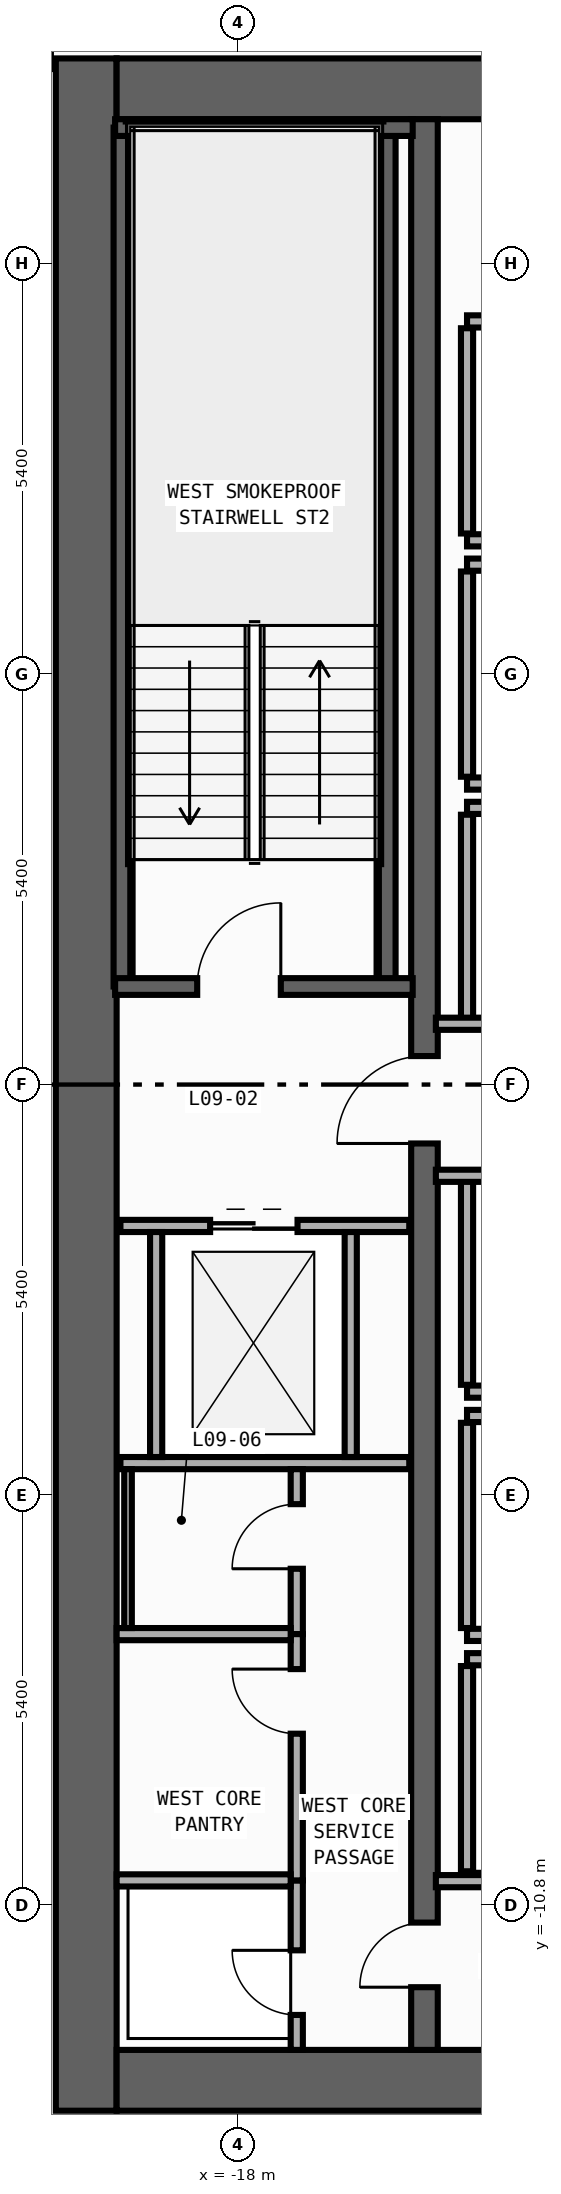
"""IFC4 building model, lengths in metres.
Left out: names, types, materials, properties, quantities, classifications, styles, units other than length and angle.
Written with IfcOpenShell. Run it as: python <this file> out.ifc"""

import sys

from ifc_helpers import new_model, si_unit, direction, frame, frame_2d, origin, place, context, subcontext, project, spatial, rectangle, extrude, element, fill, save


model = new_model("IFC4")
c1 = context("Model", 3, precision=1e-05, world=origin(), true_north=direction((0.0, 1.0)))
c2 = subcontext(c1, "Body", "Model", "MODEL_VIEW")
j1 = project(units=[si_unit("LENGTHUNIT", "METRE"), si_unit("PLANEANGLEUNIT", "RADIAN")], contexts=[c1])
p1 = place(None, origin())
s1 = spatial("IfcSite", under=j1, at=p1, CompositionType="ELEMENT")
p2 = place(p1, origin())
s2 = spatial("IfcBuilding", under=s1, at=p2, CompositionType="ELEMENT")
p3 = place(p2, frame((0.0, 0.0, 38.6)))
s3 = spatial("IfcBuildingStorey", under=s2, at=p3, CompositionType="ELEMENT", Elevation=38.6)
p4 = place(p3, frame((-20.0, -13.5, 0.0), z_axis=(0.0, 0.0, 1.0), x_axis=(0.0, 1.0, 0.0)))
e1 = element("IfcWall", 1, at=p4, inside=s3, PredefinedType="SHEAR", context=c2, shape_type="SweptSolid", body=[
    extrude(rectangle(XDim=27.0, YDim=0.8, at=frame_2d((13.5, 0.0))), origin(), (0.0, 0.0, 1.0), 3.94),
])
for number, where, z_axis, x_axis in (
    (2, (-19.6, -13.1, 0.0), (0.0, 0.0, 1.0), (1.0, 0.0, 0.0)),
    (3, (-19.6, 13.1, 0.0), (0.0, 0.0, 1.0), (1.0, 0.0, 0.0)),
):
    element("IfcWall", number, at=place(p3, frame(where, z_axis=z_axis, x_axis=x_axis)), inside=s3, PredefinedType="SHEAR", context=c2, shape_type="SweptSolid", body=[
        extrude(rectangle(XDim=6.8, YDim=0.8, at=frame_2d((3.4, 0.0))), origin(), (0.0, 0.0, 1.0), 3.94),
    ])
p5 = place(p3, frame((-15.55, -12.7, 0.0), z_axis=(0.0, 0.0, 1.0), x_axis=(0.0, 1.0, 0.0)))
e4 = element("IfcWall", 4, at=p5, inside=s3, PredefinedType="SHEAR", context=c2, shape_type="SweptSolid", body=[
    extrude(rectangle(XDim=25.4, YDim=0.35, at=frame_2d((12.7, 0.0))), origin(), (0.0, 0.0, 1.0), 3.94),
])
p6 = place(p5, frame((11.925, 0.0, 0.0)))
e5 = element("IfcOpeningElement", 5, at=p6, cuts=e4, PredefinedType="OPENING", context=c2, shape_type="SweptSolid", body=[
    extrude(rectangle(XDim=1.15, YDim=2.2, at=frame_2d((0.575, 1.1))), frame((0.0, 0.185, 0.0), z_axis=(0.0, -1.0, 0.0), x_axis=(1.0, 0.0, 0.0)), (0.0, 0.0, 1.0), 0.37),
])
p7 = place(p5, frame((0.825, 0.0, 0.0)))
e6 = element("IfcOpeningElement", 6, at=p7, cuts=e4, PredefinedType="OPENING", context=c2, shape_type="SweptSolid", body=[
    extrude(rectangle(XDim=0.85, YDim=2.1, at=frame_2d((0.425, 1.05))), frame((0.0, 0.185, 0.0), z_axis=(0.0, -1.0, 0.0), x_axis=(1.0, 0.0, 0.0)), (0.0, 0.0, 1.0), 0.37),
])
for number, where, z_axis, x_axis in (
    (7, (-16.04, 1.29, 0.0), (0.0, 0.0, 1.0), (0.0, 1.0, 0.0)),
    (8, (-19.53, 1.29, 0.0), (0.0, 0.0, 1.0), (0.0, 1.0, 0.0)),
):
    element("IfcWall", number, at=place(p3, frame(where, z_axis=z_axis, x_axis=x_axis)), inside=s3, PredefinedType="SHEAR", context=c2, shape_type="SweptSolid", body=[
        extrude(rectangle(XDim=11.3, YDim=0.22, at=frame_2d((5.65, 0.0))), origin(), (0.0, 0.0, 1.0), 3.94),
    ])
p8 = place(p3, frame((-19.62, 12.59, 0.0), z_axis=(0.0, 0.0, 1.0), x_axis=(1.0, 0.0, 0.0)))
e9 = element("IfcWall", 9, at=p8, inside=s3, PredefinedType="SHEAR", context=c2, shape_type="SweptSolid", body=[
    extrude(rectangle(XDim=3.915, YDim=0.22, at=frame_2d((1.958, 0.0))), origin(), (0.0, 0.0, 1.0), 3.94),
])
p9 = place(p3, frame((-19.62, 1.29, 0.0), z_axis=(0.0, 0.0, 1.0), x_axis=(1.0, 0.0, 0.0)))
e10 = element("IfcWall", 10, at=p9, inside=s3, PredefinedType="SHEAR", context=c2, shape_type="SweptSolid", body=[
    extrude(rectangle(XDim=3.915, YDim=0.22, at=frame_2d((1.958, 0.0))), origin(), (0.0, 0.0, 1.0), 3.94),
])
p10 = place(p9, frame((1.08, 0.0, 0.0)))
e11 = element("IfcOpeningElement", 11, at=p10, cuts=e10, PredefinedType="OPENING", context=c2, shape_type="SweptSolid", body=[
    extrude(rectangle(XDim=1.1, YDim=2.2, at=frame_2d((0.55, 1.1))), frame((0.0, 0.12, 0.0), z_axis=(0.0, -1.0, 0.0), x_axis=(1.0, 0.0, 0.0)), (0.0, 0.0, 1.0), 0.24),
])
for number, where, z_axis, x_axis in (
    (12, (-14.99, 7.16, 0.0), (0.0, 0.0, 1.0), (1.0, 0.0, 0.0)),
    (13, (-14.99, 10.04, 0.0), (0.0, 0.0, 1.0), (1.0, 0.0, 0.0)),
):
    element("IfcWall", number, at=place(p3, frame(where, z_axis=z_axis, x_axis=x_axis)), inside=s3, PredefinedType="STANDARD", context=c2, shape_type="SweptSolid", body=[
        extrude(rectangle(XDim=2.19, YDim=0.16, at=frame_2d((1.095, 0.0))), origin(), (0.0, 0.0, 1.0), 3.94),
    ])
p11 = place(p3, frame((-14.99, 7.25, 0.0), z_axis=(0.0, 0.0, 1.0), x_axis=(0.0, 1.0, 0.0)))
e14 = element("IfcWall", 14, at=p11, inside=s3, PredefinedType="STANDARD", context=c2, shape_type="SweptSolid", body=[
    extrude(rectangle(XDim=2.7, YDim=0.16, at=frame_2d((1.35, 0.0))), origin(), (0.0, 0.0, 1.0), 3.94),
])
for number, where, z_axis, x_axis in (
    (15, (-14.99, 3.96, 0.0), (0.0, 0.0, 1.0), (1.0, 0.0, 0.0)),
    (16, (-14.99, 6.84, 0.0), (0.0, 0.0, 1.0), (1.0, 0.0, 0.0)),
):
    element("IfcWall", number, at=place(p3, frame(where, z_axis=z_axis, x_axis=x_axis)), inside=s3, PredefinedType="STANDARD", context=c2, shape_type="SweptSolid", body=[
        extrude(rectangle(XDim=2.19, YDim=0.16, at=frame_2d((1.095, 0.0))), origin(), (0.0, 0.0, 1.0), 3.94),
    ])
p12 = place(p3, frame((-14.99, 4.05, 0.0), z_axis=(0.0, 0.0, 1.0), x_axis=(0.0, 1.0, 0.0)))
e17 = element("IfcWall", 17, at=p12, inside=s3, PredefinedType="STANDARD", context=c2, shape_type="SweptSolid", body=[
    extrude(rectangle(XDim=2.7, YDim=0.16, at=frame_2d((1.35, 0.0))), origin(), (0.0, 0.0, 1.0), 3.94),
])
p13 = place(p3, frame((-14.99, 3.64, 0.0), z_axis=(0.0, 0.0, 1.0), x_axis=(1.0, 0.0, 0.0)))
e18 = element("IfcWall", 18, at=p13, inside=s3, PredefinedType="STANDARD", context=c2, shape_type="SweptSolid", body=[
    extrude(rectangle(XDim=2.19, YDim=0.16, at=frame_2d((1.095, 0.0))), origin(), (0.0, 0.0, 1.0), 3.94),
])
p14 = place(p3, frame((-14.99, 0.85, 0.0), z_axis=(0.0, 0.0, 1.0), x_axis=(0.0, 1.0, 0.0)))
e19 = element("IfcWall", 19, at=p14, inside=s3, PredefinedType="STANDARD", context=c2, shape_type="SweptSolid", body=[
    extrude(rectangle(XDim=2.7, YDim=0.16, at=frame_2d((1.35, 0.0))), origin(), (0.0, 0.0, 1.0), 3.94),
])
p15 = place(p3, frame((-14.99, -4.04, 0.0), z_axis=(0.0, 0.0, 1.0), x_axis=(1.0, 0.0, 0.0)))
e20 = element("IfcWall", 20, at=p15, inside=s3, PredefinedType="STANDARD", context=c2, shape_type="SweptSolid", body=[
    extrude(rectangle(XDim=2.19, YDim=0.16, at=frame_2d((1.095, 0.0))), origin(), (0.0, 0.0, 1.0), 3.94),
])
p16 = place(p3, frame((-14.99, -3.95, 0.0), z_axis=(0.0, 0.0, 1.0), x_axis=(0.0, 1.0, 0.0)))
e21 = element("IfcWall", 21, at=p16, inside=s3, PredefinedType="STANDARD", context=c2, shape_type="SweptSolid", body=[
    extrude(rectangle(XDim=2.7, YDim=0.16, at=frame_2d((1.35, 0.0))), origin(), (0.0, 0.0, 1.0), 3.94),
])
for number, where, z_axis, x_axis in (
    (22, (-14.99, -7.24, 0.0), (0.0, 0.0, 1.0), (1.0, 0.0, 0.0)),
    (23, (-14.99, -4.36, 0.0), (0.0, 0.0, 1.0), (1.0, 0.0, 0.0)),
):
    element("IfcWall", number, at=place(p3, frame(where, z_axis=z_axis, x_axis=x_axis)), inside=s3, PredefinedType="STANDARD", context=c2, shape_type="SweptSolid", body=[
        extrude(rectangle(XDim=2.19, YDim=0.16, at=frame_2d((1.095, 0.0))), origin(), (0.0, 0.0, 1.0), 3.94),
    ])
p17 = place(p3, frame((-14.99, -7.15, 0.0), z_axis=(0.0, 0.0, 1.0), x_axis=(0.0, 1.0, 0.0)))
e24 = element("IfcWall", 24, at=p17, inside=s3, PredefinedType="STANDARD", context=c2, shape_type="SweptSolid", body=[
    extrude(rectangle(XDim=2.7, YDim=0.16, at=frame_2d((1.35, 0.0))), origin(), (0.0, 0.0, 1.0), 3.94),
])
p18 = place(p3, frame((-14.99, -7.56, 0.0), z_axis=(0.0, 0.0, 1.0), x_axis=(1.0, 0.0, 0.0)))
e25 = element("IfcWall", 25, at=p18, inside=s3, PredefinedType="STANDARD", context=c2, shape_type="SweptSolid", body=[
    extrude(rectangle(XDim=2.19, YDim=0.16, at=frame_2d((1.095, 0.0))), origin(), (0.0, 0.0, 1.0), 3.94),
])
p19 = place(p3, frame((-14.99, -10.35, 0.0), z_axis=(0.0, 0.0, 1.0), x_axis=(0.0, 1.0, 0.0)))
e26 = element("IfcWall", 26, at=p19, inside=s3, PredefinedType="STANDARD", context=c2, shape_type="SweptSolid", body=[
    extrude(rectangle(XDim=2.7, YDim=0.16, at=frame_2d((1.35, 0.0))), origin(), (0.0, 0.0, 1.0), 3.94),
])
p20 = place(p3, frame((-19.55, -1.86, 0.0), z_axis=(0.0, 0.0, 1.0), x_axis=(1.0, 0.0, 0.0)))
e27 = element("IfcWall", 27, at=p20, inside=s3, PredefinedType="STANDARD", context=c2, shape_type="SweptSolid", body=[
    extrude(rectangle(XDim=3.8, YDim=0.16, at=frame_2d((1.9, 0.0))), origin(), (0.0, 0.0, 1.0), 3.94),
])
p21 = place(p20, frame((1.18, 0.0, 0.0)))
e28 = element("IfcOpeningElement", 28, at=p21, cuts=e27, PredefinedType="OPENING", context=c2, shape_type="SweptSolid", body=[
    extrude(rectangle(XDim=1.15, YDim=2.2, at=frame_2d((0.575, 1.1))), frame((0.0, 0.09, 0.0), z_axis=(0.0, -1.0, 0.0), x_axis=(1.0, 0.0, 0.0)), (0.0, 0.0, 1.0), 0.18),
])
p22 = place(p3, frame((-19.55, -4.98, 0.0), z_axis=(0.0, 0.0, 1.0), x_axis=(1.0, 0.0, 0.0)))
e29 = element("IfcWall", 29, at=p22, inside=s3, PredefinedType="STANDARD", context=c2, shape_type="SweptSolid", body=[
    extrude(rectangle(XDim=3.8, YDim=0.16, at=frame_2d((1.9, 0.0))), origin(), (0.0, 0.0, 1.0), 3.94),
])
for number, where, z_axis, x_axis in (
    (30, (-19.08, -4.9, 0.0), (0.0, 0.0, 1.0), (0.0, 1.0, 0.0)),
    (31, (-16.52, -4.9, 0.0), (0.0, 0.0, 1.0), (0.0, 1.0, 0.0)),
):
    element("IfcWall", number, at=place(p3, frame(where, z_axis=z_axis, x_axis=x_axis)), inside=s3, PredefinedType="STANDARD", context=c2, shape_type="SweptSolid", body=[
        extrude(rectangle(XDim=2.96, YDim=0.16, at=frame_2d((1.48, 0.0))), origin(), (0.0, 0.0, 1.0), 3.94),
    ])
for number, where, z_axis, x_axis in (
    (32, (-15.4, 0.8, 0.0), (0.0, 0.0, 1.0), (1.0, 0.0, 0.0)),
    (33, (-15.4, -1.2, 0.0), (0.0, 0.0, 1.0), (1.0, 0.0, 0.0)),
    (34, (-15.4, -10.48, 0.0), (0.0, 0.0, 1.0), (1.0, 0.0, 0.0)),
):
    element("IfcWall", number, at=place(p3, frame(where, z_axis=z_axis, x_axis=x_axis)), inside=s3, PredefinedType="STANDARD", context=c2, shape_type="SweptSolid", body=[
        extrude(rectangle(XDim=2.6, YDim=0.16, at=frame_2d((1.3, 0.0))), origin(), (0.0, 0.0, 1.0), 3.94),
    ])
p23 = place(p3, frame((-17.23, -12.7, 0.0), z_axis=(0.0, 0.0, 1.0), x_axis=(0.0, 1.0, 0.0)))
e35 = element("IfcWall", 35, at=p23, inside=s3, PredefinedType="PARTITIONING", context=c2, shape_type="SweptSolid", body=[
    extrude(rectangle(XDim=2.23, YDim=0.16, at=frame_2d((1.115, 0.0))), origin(), (0.0, 0.0, 1.0), 3.94),
])
p24 = place(p23, frame((0.46, 0.0, 0.0)))
e36 = element("IfcOpeningElement", 36, at=p24, cuts=e35, PredefinedType="OPENING", context=c2, shape_type="SweptSolid", body=[
    extrude(rectangle(XDim=0.85, YDim=2.1, at=frame_2d((0.425, 1.05))), frame((0.0, 0.09, 0.0), z_axis=(0.0, -1.0, 0.0), x_axis=(1.0, 0.0, 0.0)), (0.0, 0.0, 1.0), 0.18),
])
p25 = place(p3, frame((-17.23, -7.23, 0.0), z_axis=(0.0, 0.0, 1.0), x_axis=(0.0, 1.0, 0.0)))
e37 = element("IfcWall", 37, at=p25, inside=s3, PredefinedType="PARTITIONING", context=c2, shape_type="SweptSolid", body=[
    extrude(rectangle(XDim=2.17, YDim=0.16, at=frame_2d((1.085, 0.0))), origin(), (0.0, 0.0, 1.0), 3.94),
])
p26 = place(p25, frame((0.86, 0.0, 0.0)))
e38 = element("IfcOpeningElement", 38, at=p26, cuts=e37, PredefinedType="OPENING", context=c2, shape_type="SweptSolid", body=[
    extrude(rectangle(XDim=0.85, YDim=2.1, at=frame_2d((0.425, 1.05))), frame((0.0, 0.09, 0.0), z_axis=(0.0, -1.0, 0.0), x_axis=(1.0, 0.0, 0.0)), (0.0, 0.0, 1.0), 0.18),
])
p27 = place(p3, frame((-17.23, -10.47, 0.0), z_axis=(0.0, 0.0, 1.0), x_axis=(0.0, 1.0, 0.0)))
e39 = element("IfcWall", 39, at=p27, inside=s3, PredefinedType="PARTITIONING", context=c2, shape_type="SweptSolid", body=[
    extrude(rectangle(XDim=3.24, YDim=0.16, at=frame_2d((1.62, 0.0))), origin(), (0.0, 0.0, 1.0), 3.94),
])
p28 = place(p27, frame((1.93, 0.0, 0.0)))
e40 = element("IfcOpeningElement", 40, at=p28, cuts=e39, PredefinedType="OPENING", context=c2, shape_type="SweptSolid", body=[
    extrude(rectangle(XDim=0.85, YDim=2.1, at=frame_2d((0.425, 1.05))), frame((0.0, 0.09, 0.0), z_axis=(0.0, -1.0, 0.0), x_axis=(1.0, 0.0, 0.0)), (0.0, 0.0, 1.0), 0.18),
])
for number, where, z_axis, x_axis in (
    (41, (-19.6, -10.47, 0.0), (0.0, 0.0, 1.0), (1.0, 0.0, 0.0)),
    (42, (-19.6, -7.23, 0.0), (0.0, 0.0, 1.0), (1.0, 0.0, 0.0)),
):
    element("IfcWall", number, at=place(p3, frame(where, z_axis=z_axis, x_axis=x_axis)), inside=s3, PredefinedType="PARTITIONING", context=c2, shape_type="SweptSolid", body=[
        extrude(rectangle(XDim=2.29, YDim=0.16, at=frame_2d((1.145, 0.0))), origin(), (0.0, 0.0, 1.0), 3.94),
    ])
p29 = place(p3, frame((-19.45, -7.15, 0.0), z_axis=(0.0, 0.0, 1.0), x_axis=(0.0, 1.0, 0.0)))
e43 = element("IfcWall", 43, at=p29, inside=s3, PredefinedType="PARTITIONING", context=c2, shape_type="SweptSolid", body=[
    extrude(rectangle(XDim=2.09, YDim=0.1, at=frame_2d((1.045, 0.0))), origin(), (0.0, 0.0, 1.0), 3.94),
])
p30 = place(p10, origin())
e44 = element("IfcDoor", 44, at=p30, inside=s3, OperationType="SINGLE_SWING_RIGHT", PredefinedType="DOOR", context=c2, shape_type="SweptSolid", body=[
    extrude(rectangle(XDim=1.1, YDim=2.2, at=frame_2d((0.55, 1.1))), frame((0.0, 0.025, 0.0), z_axis=(0.0, -1.0, 0.0), x_axis=(1.0, 0.0, 0.0)), (0.0, 0.0, 1.0), 0.05),
])
fill(e11, e44)
p31 = place(p6, origin())
e45 = element("IfcDoor", 45, at=p31, inside=s3, OperationType="SINGLE_SWING_LEFT", PredefinedType="DOOR", context=c2, shape_type="SweptSolid", body=[
    extrude(rectangle(XDim=1.15, YDim=2.2, at=frame_2d((0.575, 1.1))), frame((0.0, 0.025, 0.0), z_axis=(0.0, -1.0, 0.0), x_axis=(1.0, 0.0, 0.0)), (0.0, 0.0, 1.0), 0.05),
])
fill(e5, e45)
p32 = place(p7, origin())
e46 = element("IfcDoor", 46, at=p32, inside=s3, OperationType="SINGLE_SWING_LEFT", PredefinedType="DOOR", context=c2, shape_type="SweptSolid", body=[
    extrude(rectangle(XDim=0.85, YDim=2.1, at=frame_2d((0.425, 1.05))), frame((0.0, 0.025, 0.0), z_axis=(0.0, -1.0, 0.0), x_axis=(1.0, 0.0, 0.0)), (0.0, 0.0, 1.0), 0.05),
])
fill(e6, e46)
p33 = place(p21, origin())
e47 = element("IfcDoor", 47, at=p33, inside=s3, OperationType="DOUBLE_DOOR_SLIDING", PredefinedType="DOOR", context=c2, shape_type="SweptSolid", body=[
    extrude(rectangle(XDim=1.15, YDim=2.2, at=frame_2d((0.575, 1.1))), frame((0.0, 0.025, 0.0), z_axis=(0.0, -1.0, 0.0), x_axis=(1.0, 0.0, 0.0)), (0.0, 0.0, 1.0), 0.05),
])
fill(e28, e47)
p34 = place(p24, origin())
e48 = element("IfcDoor", 48, at=p34, inside=s3, OperationType="SINGLE_SWING_RIGHT", PredefinedType="DOOR", context=c2, shape_type="SweptSolid", body=[
    extrude(rectangle(XDim=0.85, YDim=2.1, at=frame_2d((0.425, 1.05))), frame((0.0, 0.025, 0.0), z_axis=(0.0, -1.0, 0.0), x_axis=(1.0, 0.0, 0.0)), (0.0, 0.0, 1.0), 0.05),
])
fill(e36, e48)
p35 = place(p26, origin())
e49 = element("IfcDoor", 49, at=p35, inside=s3, OperationType="SINGLE_SWING_LEFT", PredefinedType="DOOR", context=c2, shape_type="SweptSolid", body=[
    extrude(rectangle(XDim=0.85, YDim=2.1, at=frame_2d((0.425, 1.05))), frame((0.0, 0.025, 0.0), z_axis=(0.0, -1.0, 0.0), x_axis=(1.0, 0.0, 0.0)), (0.0, 0.0, 1.0), 0.05),
])
fill(e38, e49)
p36 = place(p28, origin())
e50 = element("IfcDoor", 50, at=p36, inside=s3, OperationType="SINGLE_SWING_RIGHT", PredefinedType="DOOR", context=c2, shape_type="SweptSolid", body=[
    extrude(rectangle(XDim=0.85, YDim=2.1, at=frame_2d((0.425, 1.05))), frame((0.0, 0.025, 0.0), z_axis=(0.0, -1.0, 0.0), x_axis=(1.0, 0.0, 0.0)), (0.0, 0.0, 1.0), 0.05),
])
fill(e40, e50)
save(model, sys.argv[1])
